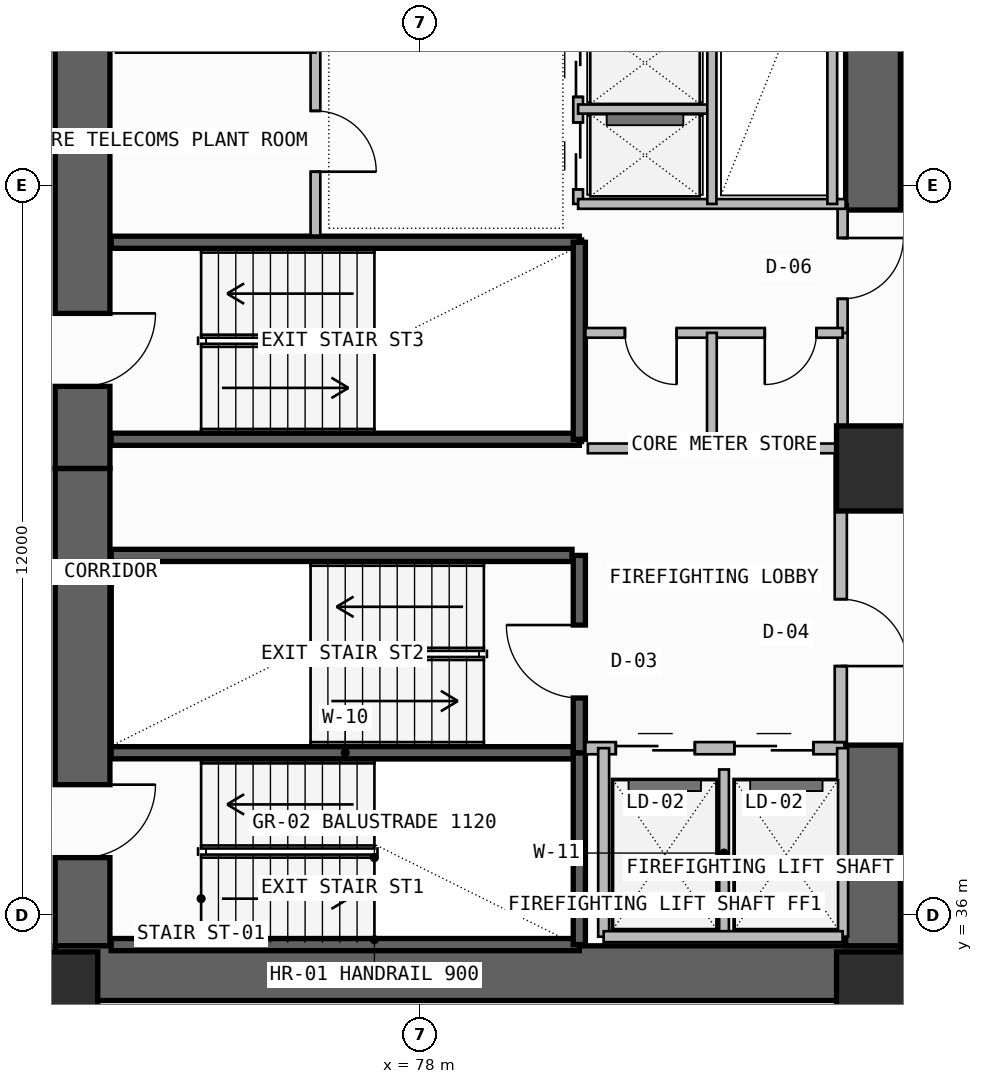
"""IFC4 building model, lengths in metres.
Left out: names, types, materials, properties, quantities, classifications, styles, units other than length and angle.
Written with IfcOpenShell. Run it as: python <this file> out.ifc"""

import sys

from ifc_helpers import new_model, si_unit, direction, frame, frame_2d, origin, origin_2d, place, context, subcontext, project, spatial, rectangle, extrude, element, fill, save


model = new_model("IFC4")
c1 = context("Model", 3, precision=1e-05, world=origin(), true_north=direction((0.0, 1.0)))
c2 = subcontext(c1, "Body", "Model", "MODEL_VIEW")
j1 = project(units=[si_unit("LENGTHUNIT", "METRE"), si_unit("PLANEANGLEUNIT", "RADIAN")], contexts=[c1])
p1 = place(None, origin())
s1 = spatial("IfcSite", under=j1, at=p1, CompositionType="ELEMENT")
p2 = place(p1, origin())
s2 = spatial("IfcBuilding", under=s1, at=p2, CompositionType="ELEMENT")
p3 = place(p2, frame((0.0, 0.0, 132.3)))
s3 = spatial("IfcBuildingStorey", under=s2, at=p3, CompositionType="ELEMENT", Elevation=132.3)
p4 = place(p3, frame((72.45, 35.5, -0.4), z_axis=(0.0, 0.0, 1.0), x_axis=(0.0, 1.0, 0.0)))
e1 = element("IfcWall", 1, at=p4, inside=s3, PredefinedType="SHEAR", context=c2, shape_type="SweptSolid", body=[
    extrude(rectangle(XDim=7.85, YDim=0.9, at=frame_2d((3.925, 0.0))), origin(), (0.0, 0.0, 1.0), 3.74),
])
p5 = place(p4, frame((1.45, 0.0, 0.4)))
e2 = element("IfcOpeningElement", 2, at=p5, cuts=e1, PredefinedType="OPENING", context=c2, shape_type="SweptSolid", body=[
    extrude(rectangle(XDim=1.2, YDim=2.2, at=frame_2d((0.6, 1.1))), frame((0.0, 0.46, 0.0), z_axis=(0.0, -1.0, 0.0), x_axis=(1.0, 0.0, 0.0)), (0.0, 0.0, 1.0), 0.92),
])
p6 = place(p3, frame((72.0, 35.05, -0.4), z_axis=(0.0, 0.0, 1.0), x_axis=(1.0, 0.0, 0.0)))
e3 = element("IfcWall", 3, at=p6, inside=s3, PredefinedType="SHEAR", context=c2, shape_type="SweptSolid", body=[
    extrude(rectangle(XDim=13.9, YDim=0.9, at=frame_2d((6.95, 0.0))), origin(), (0.0, 0.0, 1.0), 3.74),
])
p7 = place(p3, frame((85.45, 35.5, -0.4), z_axis=(0.0, 0.0, 1.0), x_axis=(0.0, 1.0, 0.0)))
e4 = element("IfcWall", 4, at=p7, inside=s3, PredefinedType="SHEAR", context=c2, shape_type="SweptSolid", body=[
    extrude(rectangle(XDim=3.3, YDim=0.9, at=frame_2d((1.65, 0.0))), origin(), (0.0, 0.0, 1.0), 3.74),
])
p8 = place(p3, frame((72.45, 43.35, -0.4), z_axis=(0.0, 0.0, 1.0), x_axis=(0.0, 1.0, 0.0)))
e5 = element("IfcWall", 5, at=p8, inside=s3, PredefinedType="SHEAR", context=c2, shape_type="SweptSolid", body=[
    extrude(rectangle(XDim=12.7, YDim=0.9, at=frame_2d((6.35, 0.0))), origin(), (0.0, 0.0, 1.0), 3.74),
])
p9 = place(p8, frame((1.35, 0.0, 0.4)))
e6 = element("IfcOpeningElement", 6, at=p9, cuts=e5, PredefinedType="OPENING", context=c2, shape_type="SweptSolid", body=[
    extrude(rectangle(XDim=1.2, YDim=2.2, at=frame_2d((0.6, 1.1))), frame((0.0, 0.46, 0.0), z_axis=(0.0, -1.0, 0.0), x_axis=(1.0, 0.0, 0.0)), (0.0, 0.0, 1.0), 0.92),
])
p10 = place(p3, frame((85.45, 47.6, -0.4), z_axis=(0.0, 0.0, 1.0), x_axis=(0.0, 1.0, 0.0)))
e7 = element("IfcWall", 7, at=p10, inside=s3, PredefinedType="SHEAR", context=c2, shape_type="SweptSolid", body=[
    extrude(rectangle(XDim=8.45, YDim=0.9, at=frame_2d((4.225, 0.0))), origin(), (0.0, 0.0, 1.0), 3.74),
])
for number, where, z_axis, x_axis in (
    (8, (72.0, 34.7, 0.0), (0.0, 0.0, 1.0), (1.0, 0.0, 0.0)),
    (9, (85.55, 34.7, 0.0), (0.0, 0.0, 1.0), (1.0, 0.0, 0.0)),
    (10, (85.55, 43.35, 0.0), (0.0, 0.0, 1.0), (1.0, 0.0, 0.0)),
):
    element("IfcColumn", number, at=place(p3, frame(where, z_axis=z_axis, x_axis=x_axis)), inside=s3, PredefinedType="COLUMN", context=c2, shape_type="SweptSolid", body=[
        extrude(rectangle(XDim=1.4, YDim=1.4, at=origin_2d()), origin(), (0.0, 0.0, 1.0), 3.6),
    ])
for number, where, z_axis, x_axis in (
    (11, (72.92, 35.52, -0.4), (0.0, 0.0, 1.0), (1.0, 0.0, 0.0)),
    (12, (72.92, 38.675, -0.4), (0.0, 0.0, 1.0), (1.0, 0.0, 0.0)),
):
    element("IfcWall", number, at=place(p3, frame(where, z_axis=z_axis, x_axis=x_axis)), inside=s3, PredefinedType="SOLIDWALL", context=c2, shape_type="SweptSolid", body=[
        extrude(rectangle(XDim=7.7, YDim=0.2, at=frame_2d((3.85, 0.0))), origin(), (0.0, 0.0, 1.0), 3.74),
    ])
p11 = place(p3, frame((80.62, 35.52, -0.4), z_axis=(0.0, 0.0, 1.0), x_axis=(0.0, 1.0, 0.0)))
e13 = element("IfcWall", 13, at=p11, inside=s3, PredefinedType="SOLIDWALL", context=c2, shape_type="SweptSolid", body=[
    extrude(rectangle(XDim=3.155, YDim=0.2, at=frame_2d((1.578, 0.0))), origin(), (0.0, 0.0, 1.0), 3.74),
])
p12 = place(p3, frame((80.62, 38.675, -0.4), z_axis=(0.0, 0.0, 1.0), x_axis=(0.0, 1.0, 0.0)))
e14 = element("IfcWall", 14, at=p12, inside=s3, PredefinedType="SOLIDWALL", context=c2, shape_type="SweptSolid", body=[
    extrude(rectangle(XDim=3.245, YDim=0.2, at=frame_2d((1.623, 0.0))), origin(), (0.0, 0.0, 1.0), 3.74),
])
p13 = place(p12, frame((0.9, 0.0, 0.4)))
e15 = element("IfcOpeningElement", 15, at=p13, cuts=e14, PredefinedType="OPENING", context=c2, shape_type="SweptSolid", body=[
    extrude(rectangle(XDim=1.2, YDim=2.2, at=frame_2d((0.6, 1.1))), frame((0.0, 0.11, 0.0), z_axis=(0.0, -1.0, 0.0), x_axis=(1.0, 0.0, 0.0)), (0.0, 0.0, 1.0), 0.22),
])
p14 = place(p3, frame((80.72, 38.75, 0.0), z_axis=(0.0, 0.0, 1.0), x_axis=(1.0, 0.0, 0.0)))
e16 = element("IfcWall", 16, at=p14, inside=s3, PredefinedType="SOLIDWALL", context=c2, shape_type="SweptSolid", body=[
    extrude(rectangle(XDim=4.26, YDim=0.2, at=frame_2d((2.13, 0.0))), origin(), (0.0, 0.0, 1.0), 3.34),
])
p15 = place(p14, frame((0.5, 0.0, 0.0)))
e17 = element("IfcOpeningElement", 17, at=p15, cuts=e16, PredefinedType="OPENING", context=c2, shape_type="SweptSolid", body=[
    extrude(rectangle(XDim=1.3, YDim=2.3, at=frame_2d((0.65, 1.15))), frame((0.0, 0.11, 0.0), z_axis=(0.0, -1.0, 0.0), x_axis=(1.0, 0.0, 0.0)), (0.0, 0.0, 1.0), 0.22),
])
p16 = place(p14, frame((2.45, 0.0, 0.0)))
e18 = element("IfcOpeningElement", 18, at=p16, cuts=e16, PredefinedType="OPENING", context=c2, shape_type="SweptSolid", body=[
    extrude(rectangle(XDim=1.3, YDim=2.3, at=frame_2d((0.65, 1.15))), frame((0.0, 0.11, 0.0), z_axis=(0.0, -1.0, 0.0), x_axis=(1.0, 0.0, 0.0)), (0.0, 0.0, 1.0), 0.22),
])
p17 = place(p3, frame((83.0, 35.65, 0.0), z_axis=(0.0, 0.0, 1.0), x_axis=(0.0, 1.0, 0.0)))
e19 = element("IfcWall", 19, at=p17, inside=s3, PredefinedType="PLUMBINGWALL", context=c2, shape_type="SweptSolid", body=[
    extrude(rectangle(XDim=2.75, YDim=0.16, at=frame_2d((1.375, 0.0))), origin(), (0.0, 0.0, 1.0), 3.34),
])
for number, where, z_axis, x_axis in (
    (20, (84.95, 35.65, 0.0), (0.0, 0.0, 1.0), (0.0, 1.0, 0.0)),
    (21, (81.02, 35.65, 0.0), (0.0, 0.0, 1.0), (0.0, 1.0, 0.0)),
):
    element("IfcWall", number, at=place(p3, frame(where, z_axis=z_axis, x_axis=x_axis)), inside=s3, PredefinedType="SOLIDWALL", context=c2, shape_type="SweptSolid", body=[
        extrude(rectangle(XDim=3.1, YDim=0.18, at=frame_2d((1.55, 0.0))), origin(), (0.0, 0.0, 1.0), 3.34),
    ])
p18 = place(p3, frame((81.02, 35.65, 0.0), z_axis=(0.0, 0.0, 1.0), x_axis=(1.0, 0.0, 0.0)))
e22 = element("IfcWall", 22, at=p18, inside=s3, PredefinedType="SOLIDWALL", context=c2, shape_type="SweptSolid", body=[
    extrude(rectangle(XDim=3.93, YDim=0.18, at=frame_2d((1.965, 0.0))), origin(), (0.0, 0.0, 1.0), 3.34),
])
p19 = place(p3, frame((84.92, 38.85, 0.0), z_axis=(0.0, 0.0, 1.0), x_axis=(0.0, 1.0, 0.0)))
e23 = element("IfcWall", 23, at=p19, inside=s3, PredefinedType="SOLIDWALL", context=c2, shape_type="SweptSolid", body=[
    extrude(rectangle(XDim=4.83, YDim=0.2, at=frame_2d((2.415, 0.0))), origin(), (0.0, 0.0, 1.0), 3.34),
])
p20 = place(p19, frame((1.25, 0.0, 0.0)))
e24 = element("IfcOpeningElement", 24, at=p20, cuts=e23, PredefinedType="OPENING", context=c2, shape_type="SweptSolid", body=[
    extrude(rectangle(XDim=1.1, YDim=2.2, at=frame_2d((0.55, 1.1))), frame((0.0, 0.11, 0.0), z_axis=(0.0, -1.0, 0.0), x_axis=(1.0, 0.0, 0.0)), (0.0, 0.0, 1.0), 0.22),
])
p21 = place(p3, frame((72.92, 41.92, -0.4), z_axis=(0.0, 0.0, 1.0), x_axis=(1.0, 0.0, 0.0)))
e25 = element("IfcWall", 25, at=p21, inside=s3, PredefinedType="SOLIDWALL", context=c2, shape_type="SweptSolid", body=[
    extrude(rectangle(XDim=7.58, YDim=0.2, at=frame_2d((3.79, 0.0))), origin(), (0.0, 0.0, 1.0), 3.74),
])
for number, where, z_axis, x_axis in (
    (26, (72.92, 43.83, -0.4), (0.0, 0.0, 1.0), (1.0, 0.0, 0.0)),
    (27, (72.92, 47.07, -0.4), (0.0, 0.0, 1.0), (1.0, 0.0, 0.0)),
):
    element("IfcWall", number, at=place(p3, frame(where, z_axis=z_axis, x_axis=x_axis)), inside=s3, PredefinedType="SOLIDWALL", context=c2, shape_type="SweptSolid", body=[
        extrude(rectangle(XDim=7.7, YDim=0.2, at=frame_2d((3.85, 0.0))), origin(), (0.0, 0.0, 1.0), 3.74),
    ])
p22 = place(p3, frame((80.62, 43.83, -0.4), z_axis=(0.0, 0.0, 1.0), x_axis=(0.0, 1.0, 0.0)))
e28 = element("IfcWall", 28, at=p22, inside=s3, PredefinedType="SOLIDWALL", context=c2, shape_type="SweptSolid", body=[
    extrude(rectangle(XDim=3.24, YDim=0.2, at=frame_2d((1.62, 0.0))), origin(), (0.0, 0.0, 1.0), 3.74),
])
p23 = place(p3, frame((84.95, 43.68, 0.0), z_axis=(0.0, 0.0, 1.0), x_axis=(0.0, 1.0, 0.0)))
e29 = element("IfcWall", 29, at=p23, inside=s3, PredefinedType="PLUMBINGWALL", context=c2, shape_type="SweptSolid", body=[
    extrude(rectangle(XDim=1.9, YDim=0.165, at=frame_2d((0.95, 0.0))), origin(), (0.0, 0.0, 1.0), 3.34),
])
p24 = place(p3, frame((84.95, 45.58, 0.0), z_axis=(0.0, 0.0, 1.0), x_axis=(0.0, 1.0, 0.0)))
e30 = element("IfcWall", 30, at=p24, inside=s3, PredefinedType="PARTITIONING", context=c2, shape_type="SweptSolid", body=[
    extrude(rectangle(XDim=2.12, YDim=0.165, at=frame_2d((1.06, 0.0))), origin(), (0.0, 0.0, 1.0), 3.34),
])
p25 = place(p24, frame((0.56, 0.0, 0.0)))
e31 = element("IfcOpeningElement", 31, at=p25, cuts=e30, PredefinedType="OPENING", context=c2, shape_type="SweptSolid", body=[
    extrude(rectangle(XDim=1.0, YDim=2.2, at=frame_2d((0.5, 1.1))), frame((0.0, 0.093, 0.0), z_axis=(0.0, -1.0, 0.0), x_axis=(1.0, 0.0, 0.0)), (0.0, 0.0, 1.0), 0.185),
])
p26 = place(p3, frame((80.72, 45.58, 0.0), z_axis=(0.0, 0.0, 1.0), x_axis=(1.0, 0.0, 0.0)))
e32 = element("IfcWall", 32, at=p26, inside=s3, PredefinedType="PLUMBINGWALL", context=c2, shape_type="SweptSolid", body=[
    extrude(rectangle(XDim=4.23, YDim=0.16, at=frame_2d((2.115, 0.0))), origin(), (0.0, 0.0, 1.0), 3.34),
])
p27 = place(p26, frame((0.65, 0.0, 0.0)))
e33 = element("IfcOpeningElement", 33, at=p27, cuts=e32, PredefinedType="OPENING", context=c2, shape_type="SweptSolid", body=[
    extrude(rectangle(XDim=0.85, YDim=2.05, at=frame_2d((0.425, 1.025))), frame((0.0, 0.09, 0.0), z_axis=(0.0, -1.0, 0.0), x_axis=(1.0, 0.0, 0.0)), (0.0, 0.0, 1.0), 0.18),
])
p28 = place(p26, frame((2.95, 0.0, 0.0)))
e34 = element("IfcOpeningElement", 34, at=p28, cuts=e32, PredefinedType="OPENING", context=c2, shape_type="SweptSolid", body=[
    extrude(rectangle(XDim=0.85, YDim=2.05, at=frame_2d((0.425, 1.025))), frame((0.0, 0.09, 0.0), z_axis=(0.0, -1.0, 0.0), x_axis=(1.0, 0.0, 0.0)), (0.0, 0.0, 1.0), 0.18),
])
p29 = place(p3, frame((80.76, 43.68, 0.0), z_axis=(0.0, 0.0, 1.0), x_axis=(1.0, 0.0, 0.0)))
e35 = element("IfcWall", 35, at=p29, inside=s3, PredefinedType="PLUMBINGWALL", context=c2, shape_type="SweptSolid", body=[
    extrude(rectangle(XDim=4.19, YDim=0.16, at=frame_2d((2.095, 0.0))), origin(), (0.0, 0.0, 1.0), 3.34),
])
p30 = place(p3, frame((82.8, 43.68, 0.0), z_axis=(0.0, 0.0, 1.0), x_axis=(0.0, 1.0, 0.0)))
e36 = element("IfcWall", 36, at=p30, inside=s3, PredefinedType="PLUMBINGWALL", context=c2, shape_type="SweptSolid", body=[
    extrude(rectangle(XDim=1.9, YDim=0.16, at=frame_2d((0.95, 0.0))), origin(), (0.0, 0.0, 1.0), 3.34),
])
p31 = place(p3, frame((76.28, 47.18, 0.0), z_axis=(0.0, 0.0, 1.0), x_axis=(0.0, 1.0, 0.0)))
e37 = element("IfcWall", 37, at=p31, inside=s3, PredefinedType="SOLIDWALL", context=c2, shape_type="SweptSolid", body=[
    extrude(rectangle(XDim=5.14, YDim=0.16, at=frame_2d((2.57, 0.0))), origin(), (0.0, 0.0, 1.0), 3.34),
])
p32 = place(p31, frame((1.05, 0.0, 0.0)))
e38 = element("IfcOpeningElement", 38, at=p32, cuts=e37, PredefinedType="OPENING", context=c2, shape_type="SweptSolid", body=[
    extrude(rectangle(XDim=1.0, YDim=2.2, at=frame_2d((0.5, 1.1))), frame((0.0, 0.09, 0.0), z_axis=(0.0, -1.0, 0.0), x_axis=(1.0, 0.0, 0.0)), (0.0, 0.0, 1.0), 0.18),
])
p33 = place(p31, frame((3.45, 0.0, 0.0)))
e39 = element("IfcOpeningElement", 39, at=p33, cuts=e37, PredefinedType="OPENING", context=c2, shape_type="SweptSolid", body=[
    extrude(rectangle(XDim=0.9, YDim=2.1, at=frame_2d((0.45, 1.05))), frame((0.0, 0.09, 0.0), z_axis=(0.0, -1.0, 0.0), x_axis=(1.0, 0.0, 0.0)), (0.0, 0.0, 1.0), 0.18),
])
p34 = place(p3, frame((73.0, 50.25, 0.0), z_axis=(0.0, 0.0, 1.0), x_axis=(1.0, 0.0, 0.0)))
e40 = element("IfcWall", 40, at=p34, inside=s3, PredefinedType="PARTITIONING", context=c2, shape_type="SweptSolid", body=[
    extrude(rectangle(XDim=3.28, YDim=0.125, at=frame_2d((1.64, 0.0))), origin(), (0.0, 0.0, 1.0), 3.34),
])
p35 = place(p3, frame((80.6, 47.7, 0.0), z_axis=(0.0, 0.0, 1.0), x_axis=(0.0, 1.0, 0.0)))
e41 = element("IfcWall", 41, at=p35, inside=s3, PredefinedType="SOLIDWALL", context=c2, shape_type="SweptSolid", body=[
    extrude(rectangle(XDim=4.6, YDim=0.16, at=frame_2d((2.3, 0.0))), origin(), (0.0, 0.0, 1.0), 3.34),
])
p36 = place(p35, frame((0.24, 0.0, 0.0)))
e42 = element("IfcOpeningElement", 42, at=p36, cuts=e41, PredefinedType="OPENING", context=c2, shape_type="SweptSolid", body=[
    extrude(rectangle(XDim=1.1, YDim=2.25, at=frame_2d((0.55, 1.125))), frame((0.0, 0.09, 0.0), z_axis=(0.0, -1.0, 0.0), x_axis=(1.0, 0.0, 0.0)), (0.0, 0.0, 1.0), 0.18),
])
p37 = place(p35, frame((1.76, 0.0, 0.0)))
e43 = element("IfcOpeningElement", 43, at=p37, cuts=e41, PredefinedType="OPENING", context=c2, shape_type="SweptSolid", body=[
    extrude(rectangle(XDim=1.1, YDim=2.25, at=frame_2d((0.55, 1.125))), frame((0.0, 0.09, 0.0), z_axis=(0.0, -1.0, 0.0), x_axis=(1.0, 0.0, 0.0)), (0.0, 0.0, 1.0), 0.18),
])
p38 = place(p35, frame((3.28, 0.0, 0.0)))
e44 = element("IfcOpeningElement", 44, at=p38, cuts=e41, PredefinedType="OPENING", context=c2, shape_type="SweptSolid", body=[
    extrude(rectangle(XDim=1.1, YDim=2.25, at=frame_2d((0.55, 1.125))), frame((0.0, 0.09, 0.0), z_axis=(0.0, -1.0, 0.0), x_axis=(1.0, 0.0, 0.0)), (0.0, 0.0, 1.0), 0.18),
])
p39 = place(p3, frame((80.6, 47.7, 0.0), z_axis=(0.0, 0.0, 1.0), x_axis=(1.0, 0.0, 0.0)))
e45 = element("IfcWall", 45, at=p39, inside=s3, PredefinedType="SOLIDWALL", context=c2, shape_type="SweptSolid", body=[
    extrude(rectangle(XDim=4.4, YDim=0.16, at=frame_2d((2.2, 0.0))), origin(), (0.0, 0.0, 1.0), 3.34),
])
p40 = place(p3, frame((80.6, 49.26, 0.0), z_axis=(0.0, 0.0, 1.0), x_axis=(1.0, 0.0, 0.0)))
e46 = element("IfcWall", 46, at=p40, inside=s3, PredefinedType="PLUMBINGWALL", context=c2, shape_type="SweptSolid", body=[
    extrude(rectangle(XDim=2.2, YDim=0.15, at=frame_2d((1.1, 0.0))), origin(), (0.0, 0.0, 1.0), 3.34),
])
p41 = place(p3, frame((82.8, 47.7, 0.0), z_axis=(0.0, 0.0, 1.0), x_axis=(0.0, 1.0, 0.0)))
e47 = element("IfcWall", 47, at=p41, inside=s3, PredefinedType="PLUMBINGWALL", context=c2, shape_type="SweptSolid", body=[
    extrude(rectangle(XDim=4.6, YDim=0.15, at=frame_2d((2.3, 0.0))), origin(), (0.0, 0.0, 1.0), 3.34),
])
p42 = place(p3, frame((84.78, 47.7, 0.0), z_axis=(0.0, 0.0, 1.0), x_axis=(0.0, 1.0, 0.0)))
e48 = element("IfcWall", 48, at=p42, inside=s3, PredefinedType="SOLIDWALL", context=c2, shape_type="SweptSolid", body=[
    extrude(rectangle(XDim=4.6, YDim=0.16, at=frame_2d((2.3, 0.0))), origin(), (0.0, 0.0, 1.0), 3.34),
])
p43 = place(p5, frame((1.2, 0.0, 0.0), z_axis=(0.0, 0.0, 1.0), x_axis=(-1.0, 0.0, 0.0)))
e49 = element("IfcDoor", 49, at=p43, inside=s3, OperationType="SINGLE_SWING_LEFT", PredefinedType="USERDEFINED", context=c2, shape_type="SweptSolid", body=[
    extrude(rectangle(XDim=1.2, YDim=2.2, at=frame_2d((0.6, 1.1))), frame((0.0, 0.025, 0.0), z_axis=(0.0, -1.0, 0.0), x_axis=(1.0, 0.0, 0.0)), (0.0, 0.0, 1.0), 0.05),
])
fill(e2, e49)
p44 = place(p13, origin())
e50 = element("IfcDoor", 50, at=p44, inside=s3, OperationType="SINGLE_SWING_RIGHT", PredefinedType="USERDEFINED", context=c2, shape_type="SweptSolid", body=[
    extrude(rectangle(XDim=1.2, YDim=2.2, at=frame_2d((0.6, 1.1))), frame((0.0, 0.025, 0.0), z_axis=(0.0, -1.0, 0.0), x_axis=(1.0, 0.0, 0.0)), (0.0, 0.0, 1.0), 0.05),
])
fill(e15, e50)
p45 = place(p15, origin())
e51 = element("IfcDoor", 51, at=p45, inside=s3, OperationType="DOUBLE_DOOR_SLIDING", PredefinedType="DOOR", context=c2, shape_type="SweptSolid", body=[
    extrude(rectangle(XDim=1.3, YDim=2.3, at=frame_2d((0.65, 1.15))), frame((0.0, 0.025, 0.0), z_axis=(0.0, -1.0, 0.0), x_axis=(1.0, 0.0, 0.0)), (0.0, 0.0, 1.0), 0.05),
])
fill(e17, e51)
p46 = place(p16, origin())
e52 = element("IfcDoor", 52, at=p46, inside=s3, OperationType="DOUBLE_DOOR_SLIDING", PredefinedType="DOOR", context=c2, shape_type="SweptSolid", body=[
    extrude(rectangle(XDim=1.3, YDim=2.3, at=frame_2d((0.65, 1.15))), frame((0.0, 0.025, 0.0), z_axis=(0.0, -1.0, 0.0), x_axis=(1.0, 0.0, 0.0)), (0.0, 0.0, 1.0), 0.05),
])
fill(e18, e52)
p47 = place(p20, frame((1.1, 0.0, 0.0), z_axis=(0.0, 0.0, 1.0), x_axis=(-1.0, 0.0, 0.0)))
e53 = element("IfcDoor", 53, at=p47, inside=s3, OperationType="SINGLE_SWING_RIGHT", PredefinedType="DOOR", context=c2, shape_type="SweptSolid", body=[
    extrude(rectangle(XDim=1.1, YDim=2.2, at=frame_2d((0.55, 1.1))), frame((0.0, 0.025, 0.0), z_axis=(0.0, -1.0, 0.0), x_axis=(1.0, 0.0, 0.0)), (0.0, 0.0, 1.0), 0.05),
])
fill(e24, e53)
p48 = place(p9, frame((1.2, 0.0, 0.0), z_axis=(0.0, 0.0, 1.0), x_axis=(-1.0, 0.0, 0.0)))
e54 = element("IfcDoor", 54, at=p48, inside=s3, OperationType="SINGLE_SWING_LEFT", PredefinedType="USERDEFINED", context=c2, shape_type="SweptSolid", body=[
    extrude(rectangle(XDim=1.2, YDim=2.2, at=frame_2d((0.6, 1.1))), frame((0.0, 0.025, 0.0), z_axis=(0.0, -1.0, 0.0), x_axis=(1.0, 0.0, 0.0)), (0.0, 0.0, 1.0), 0.05),
])
fill(e6, e54)
p49 = place(p25, frame((1.0, 0.0, 0.0), z_axis=(0.0, 0.0, 1.0), x_axis=(-1.0, 0.0, 0.0)))
e55 = element("IfcDoor", 55, at=p49, inside=s3, OperationType="SINGLE_SWING_LEFT", PredefinedType="DOOR", context=c2, shape_type="SweptSolid", body=[
    extrude(rectangle(XDim=1.0, YDim=2.2, at=frame_2d((0.5, 1.1))), frame((0.0, 0.025, 0.0), z_axis=(0.0, -1.0, 0.0), x_axis=(1.0, 0.0, 0.0)), (0.0, 0.0, 1.0), 0.05),
])
fill(e31, e55)
p50 = place(p27, frame((0.85, 0.0, 0.0), z_axis=(0.0, 0.0, 1.0), x_axis=(-1.0, 0.0, 0.0)))
e56 = element("IfcDoor", 56, at=p50, inside=s3, OperationType="SINGLE_SWING_LEFT", PredefinedType="DOOR", context=c2, shape_type="SweptSolid", body=[
    extrude(rectangle(XDim=0.85, YDim=2.05, at=frame_2d((0.425, 1.025))), frame((0.0, 0.025, 0.0), z_axis=(0.0, -1.0, 0.0), x_axis=(1.0, 0.0, 0.0)), (0.0, 0.0, 1.0), 0.05),
])
fill(e33, e56)
p51 = place(p28, frame((0.85, 0.0, 0.0), z_axis=(0.0, 0.0, 1.0), x_axis=(-1.0, 0.0, 0.0)))
e57 = element("IfcDoor", 57, at=p51, inside=s3, OperationType="SINGLE_SWING_RIGHT", PredefinedType="DOOR", context=c2, shape_type="SweptSolid", body=[
    extrude(rectangle(XDim=0.85, YDim=2.05, at=frame_2d((0.425, 1.025))), frame((0.0, 0.025, 0.0), z_axis=(0.0, -1.0, 0.0), x_axis=(1.0, 0.0, 0.0)), (0.0, 0.0, 1.0), 0.05),
])
fill(e34, e57)
p52 = place(p32, frame((1.0, 0.0, 0.0), z_axis=(0.0, 0.0, 1.0), x_axis=(-1.0, 0.0, 0.0)))
e58 = element("IfcDoor", 58, at=p52, inside=s3, OperationType="SINGLE_SWING_RIGHT", PredefinedType="DOOR", context=c2, shape_type="SweptSolid", body=[
    extrude(rectangle(XDim=1.0, YDim=2.2, at=frame_2d((0.5, 1.1))), frame((0.0, 0.025, 0.0), z_axis=(0.0, -1.0, 0.0), x_axis=(1.0, 0.0, 0.0)), (0.0, 0.0, 1.0), 0.05),
])
fill(e38, e58)
p53 = place(p36, frame((1.1, 0.0, 0.0), z_axis=(0.0, 0.0, 1.0), x_axis=(-1.0, 0.0, 0.0)))
e59 = element("IfcDoor", 59, at=p53, inside=s3, OperationType="DOUBLE_DOOR_SLIDING", PredefinedType="DOOR", context=c2, shape_type="SweptSolid", body=[
    extrude(rectangle(XDim=1.1, YDim=2.25, at=frame_2d((0.55, 1.125))), frame((0.0, 0.025, 0.0), z_axis=(0.0, -1.0, 0.0), x_axis=(1.0, 0.0, 0.0)), (0.0, 0.0, 1.0), 0.05),
])
fill(e42, e59)
p54 = place(p37, frame((1.1, 0.0, 0.0), z_axis=(0.0, 0.0, 1.0), x_axis=(-1.0, 0.0, 0.0)))
e60 = element("IfcDoor", 60, at=p54, inside=s3, OperationType="DOUBLE_DOOR_SLIDING", PredefinedType="DOOR", context=c2, shape_type="SweptSolid", body=[
    extrude(rectangle(XDim=1.1, YDim=2.25, at=frame_2d((0.55, 1.125))), frame((0.0, 0.025, 0.0), z_axis=(0.0, -1.0, 0.0), x_axis=(1.0, 0.0, 0.0)), (0.0, 0.0, 1.0), 0.05),
])
fill(e43, e60)
save(model, sys.argv[1])
